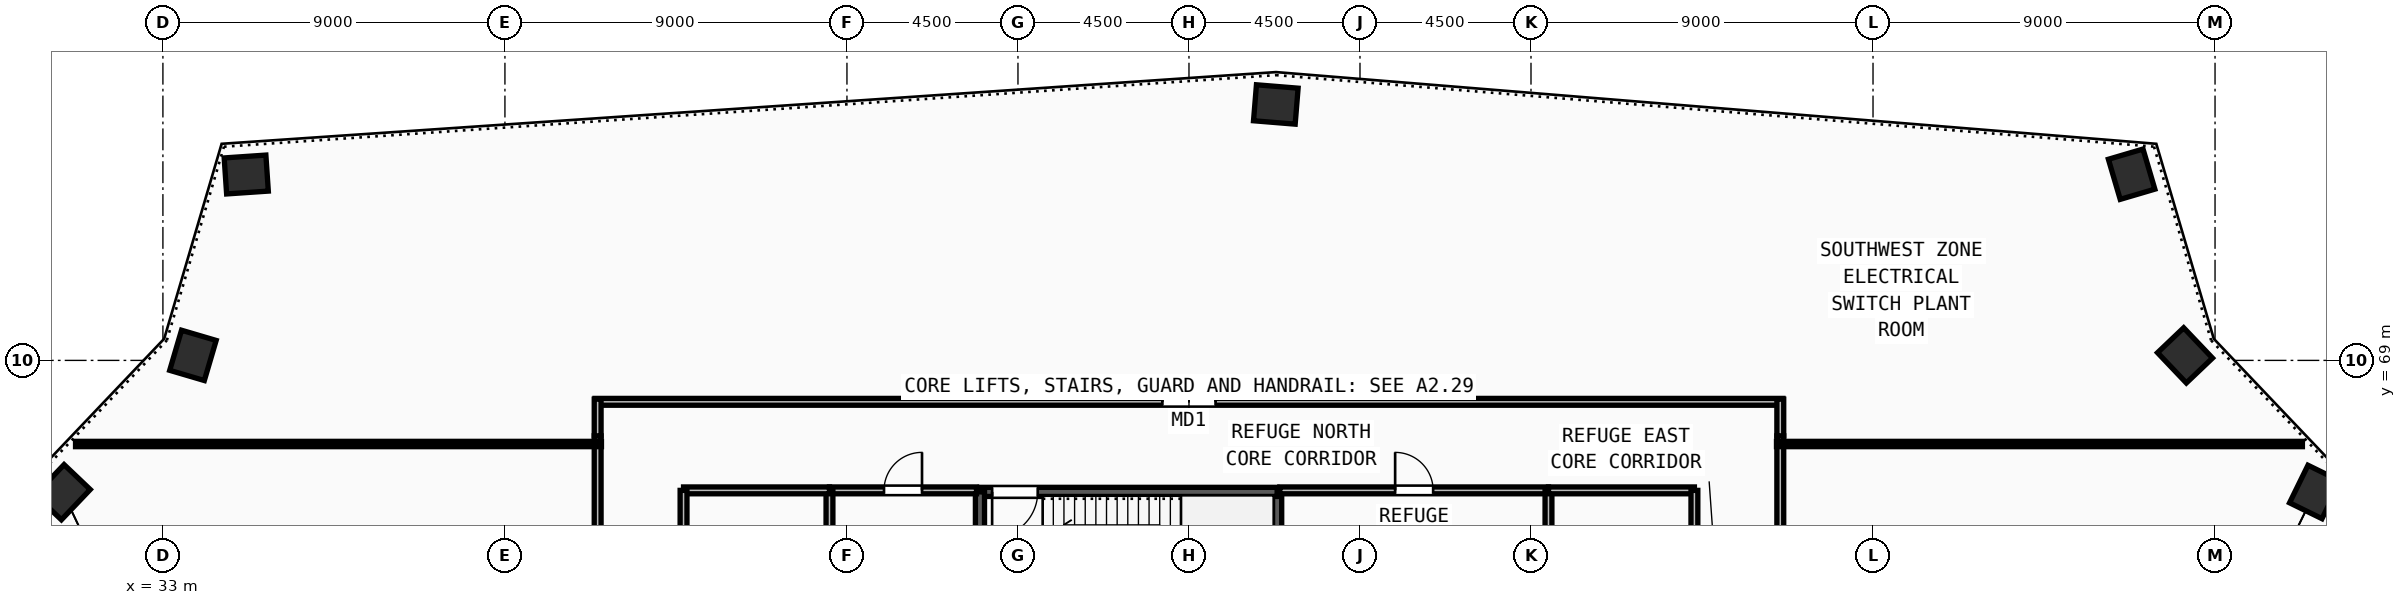
"""IFC4 building model, lengths in metres.
Left out: names, types, materials, properties, quantities, classifications, styles, units other than length and angle.
Written with IfcOpenShell. Run it as: python <this file> out.ifc"""

import sys

from ifc_helpers import new_model, si_unit, direction, frame, frame_2d, origin, origin_2d, place, context, subcontext, project, spatial, rectangle, extrude, source, transform, mapped, element, fill, save


model = new_model("IFC4")
c1 = context("Model", 3, precision=1e-05, world=origin(), true_north=direction((0.0, 1.0)))
c2 = subcontext(c1, "Body", "Model", "MODEL_VIEW")
j1 = project(units=[si_unit("LENGTHUNIT", "METRE"), si_unit("PLANEANGLEUNIT", "RADIAN")], contexts=[c1])
p1 = place(None, origin())
s1 = spatial("IfcSite", under=j1, at=p1, CompositionType="ELEMENT")
p2 = place(p1, origin())
s2 = spatial("IfcBuilding", under=s1, at=p2, CompositionType="ELEMENT")
p3 = place(p2, frame((0.0, 0.0, 324.0)))
s3 = spatial("IfcBuildingStorey", under=s2, at=p3, CompositionType="ELEMENT", Elevation=324.0)
m1 = source(origin(), c2, "Body", "SweptSolid", [
    extrude(rectangle(XDim=1.1, YDim=0.95, at=origin_2d()), origin(), (0.0, 0.0, 1.0), 4.5),
])
for number, where, z_axis, x_axis in (
    (1, (30.364, 65.532, 0.0), (0.0, 0.0, 1.0), (0.689, 0.724, 0.0)),
    (2, (33.79, 69.132, 0.0), (0.0, 0.0, 1.0), (0.283, 0.959, 0.0)),
    (3, (35.193, 73.891, 0.0), (0.0, 0.0, 1.0), (0.998, 0.068, 0.0)),
    (4, (62.285, 75.734, 0.0), (0.0, 0.0, 1.0), (-0.997, 0.081, 0.0)),
    (5, (84.805, 73.899, 0.0), (0.0, 0.0, 1.0), (-0.283, 0.959, 0.0)),
    (6, (86.21, 69.132, 0.0), (0.0, 0.0, 1.0), (-0.689, 0.724, 0.0)),
    (7, (89.63, 65.538, 0.0), (0.0, 0.0, 1.0), (0.44, 0.898, 0.0)),
):
    element("IfcColumn", number, at=place(p3, frame(where, z_axis=z_axis, x_axis=x_axis)), inside=s3, PredefinedType="COLUMN", context=c2, shape_type="MappedRepresentation", body=[
        mapped(m1, transform((0.0, 0.0, 0.0), x_axis=(1.0, 0.0, 0.0), y_axis=(0.0, 1.0, 0.0), z_axis=(0.0, 0.0, 1.0), scale=1.0)),
    ])
p4 = place(p3, frame((62.32, 62.1, 0.0), z_axis=(0.0, 0.0, 1.0), x_axis=(0.0, 1.0, 0.0)))
e8 = element("IfcWall", 8, at=p4, inside=s3, PredefinedType="SOLIDWALL", context=c2, shape_type="SweptSolid", body=[
    extrude(rectangle(XDim=3.44, YDim=0.24, at=frame_2d((1.72, 0.0))), origin(), (0.0, 0.0, 1.0), 4.32),
])
p5 = place(p3, frame((62.32, 65.54, 0.0), z_axis=(0.0, 0.0, 1.0), x_axis=(-1.0, 0.0, 0.0)))
e9 = element("IfcWall", 9, at=p5, inside=s3, PredefinedType="SOLIDWALL", context=c2, shape_type="SweptSolid", body=[
    extrude(rectangle(XDim=7.82, YDim=0.24, at=frame_2d((3.91, 0.0))), origin(), (0.0, 0.0, 1.0), 4.32),
])
m2 = source(origin(), c2, "Body", "SweptSolid", [
    extrude(rectangle(XDim=1.2, YDim=2.2, at=frame_2d((0.6, 1.1))), frame((0.0, 0.13, 0.0), z_axis=(0.0, -1.0, 0.0), x_axis=(1.0, 0.0, 0.0)), (0.0, 0.0, 1.0), 0.26),
])
p6 = place(p5, frame((6.3, 0.0, 0.0)))
e10 = element("IfcOpeningElement", 10, at=p6, cuts=e9, PredefinedType="OPENING", context=c2, shape_type="MappedRepresentation", body=[
    mapped(m2, transform((0.0, 0.0, 0.0), x_axis=(1.0, 0.0, 0.0), y_axis=(0.0, 1.0, 0.0), z_axis=(0.0, 0.0, 1.0), scale=1.0)),
])
p7 = place(p3, frame((54.5, 65.54, 0.0), z_axis=(0.0, 0.0, 1.0), x_axis=(0.0, -1.0, 0.0)))
e11 = element("IfcWall", 11, at=p7, inside=s3, PredefinedType="SOLIDWALL", context=c2, shape_type="SweptSolid", body=[
    extrude(rectangle(XDim=3.44, YDim=0.24, at=frame_2d((1.72, 0.0))), origin(), (0.0, 0.0, 1.0), 4.32),
])
p8 = place(p3, frame((50.54, 65.58, 0.0), z_axis=(0.0, 0.0, 1.0), x_axis=(1.0, 0.0, 0.0)))
e12 = element("IfcWall", 12, at=p8, inside=s3, PredefinedType="PARTITIONING", context=c2, shape_type="SweptSolid", body=[
    extrude(rectangle(XDim=3.87, YDim=0.18, at=frame_2d((1.935, 0.0))), origin(), (0.0, 0.0, 1.0), 4.32),
])
m3 = source(origin(), c2, "Body", "SweptSolid", [
    extrude(rectangle(XDim=1.0, YDim=2.2, at=frame_2d((0.5, 1.1))), frame((0.0, 0.1, 0.0), z_axis=(0.0, -1.0, 0.0), x_axis=(1.0, 0.0, 0.0)), (0.0, 0.0, 1.0), 0.2),
])
p9 = place(p8, frame((1.435, 0.0, 0.0)))
e13 = element("IfcOpeningElement", 13, at=p9, cuts=e12, PredefinedType="OPENING", context=c2, shape_type="MappedRepresentation", body=[
    mapped(m3, transform((0.0, 0.0, 0.0), x_axis=(1.0, 0.0, 0.0), y_axis=(0.0, 1.0, 0.0), z_axis=(0.0, 0.0, 1.0), scale=1.0)),
])
p10 = place(p3, frame((62.39, 65.58, 0.0), z_axis=(0.0, 0.0, 1.0), x_axis=(1.0, 0.0, 0.0)))
e14 = element("IfcWall", 14, at=p10, inside=s3, PredefinedType="PARTITIONING", context=c2, shape_type="SweptSolid", body=[
    extrude(rectangle(XDim=7.07, YDim=0.18, at=frame_2d((3.535, 0.0))), origin(), (0.0, 0.0, 1.0), 4.32),
])
p11 = place(p10, frame((3.035, 0.0, 0.0)))
e15 = element("IfcOpeningElement", 15, at=p11, cuts=e14, PredefinedType="OPENING", context=c2, shape_type="MappedRepresentation", body=[
    mapped(m3, transform((0.0, 0.0, 0.0), x_axis=(1.0, 0.0, 0.0), y_axis=(0.0, 1.0, 0.0), z_axis=(0.0, 0.0, 1.0), scale=1.0)),
])
p12 = place(p3, frame((75.56, 67.015, 0.0), z_axis=(0.0, 0.0, 1.0), x_axis=(0.0, -1.0, 0.0)))
e16 = element("IfcWall", 16, at=p12, inside=s3, PredefinedType="PARTITIONING", context=c2, shape_type="SweptSolid", body=[
    extrude(rectangle(XDim=22.43, YDim=0.18, at=frame_2d((11.215, 0.0))), origin(), (0.0, 0.0, 1.0), 4.32),
])
m4 = source(origin(), c2, "Body", "SweptSolid", [
    extrude(rectangle(XDim=1.3, YDim=2.2, at=frame_2d((0.65, 1.1))), frame((0.0, 0.1, 0.0), z_axis=(0.0, -1.0, 0.0), x_axis=(1.0, 0.0, 0.0)), (0.0, 0.0, 1.0), 0.2),
])
p13 = place(p12, frame((10.565, 0.0, 0.0)))
e17 = element("IfcOpeningElement", 17, at=p13, cuts=e16, PredefinedType="OPENING", context=c2, shape_type="MappedRepresentation", body=[
    mapped(m4, transform((0.0, 0.0, 0.0), x_axis=(1.0, 0.0, 0.0), y_axis=(0.0, 1.0, 0.0), z_axis=(0.0, 0.0, 1.0), scale=1.0)),
])
p14 = place(p3, frame((44.37, 67.91, 0.0), z_axis=(0.0, 0.0, 1.0), x_axis=(1.0, 0.0, 0.0)))
e18 = element("IfcWall", 18, at=p14, inside=s3, PredefinedType="PARTITIONING", context=c2, shape_type="SweptSolid", body=[
    extrude(rectangle(XDim=31.26, YDim=0.18, at=frame_2d((15.63, 0.0))), origin(), (0.0, 0.0, 1.0), 4.32),
])
m5 = source(origin(), c2, "Body", "SweptSolid", [
    extrude(rectangle(XDim=1.4, YDim=2.25, at=frame_2d((0.7, 1.125))), frame((0.0, 0.1, 0.0), z_axis=(0.0, -1.0, 0.0), x_axis=(1.0, 0.0, 0.0)), (0.0, 0.0, 1.0), 0.2),
])
p15 = place(p14, frame((14.93, 0.0, 0.0)))
e19 = element("IfcOpeningElement", 19, at=p15, cuts=e18, PredefinedType="OPENING", context=c2, shape_type="MappedRepresentation", body=[
    mapped(m5, transform((0.0, 0.0, 0.0), x_axis=(1.0, 0.0, 0.0), y_axis=(0.0, 1.0, 0.0), z_axis=(0.0, 0.0, 1.0), scale=1.0)),
])
p16 = place(p3, frame((44.44, 55.98, 0.0), z_axis=(0.0, 0.0, 1.0), x_axis=(0.0, 1.0, 0.0)))
e20 = element("IfcWall", 20, at=p16, inside=s3, PredefinedType="PARTITIONING", context=c2, shape_type="SweptSolid", body=[
    extrude(rectangle(XDim=11.035, YDim=0.18, at=frame_2d((5.518, 0.0))), origin(), (0.0, 0.0, 1.0), 4.32),
])
p17 = place(p16, frame((4.218, 0.0, 0.0)))
e21 = element("IfcOpeningElement", 21, at=p17, cuts=e20, PredefinedType="OPENING", context=c2, shape_type="MappedRepresentation", body=[
    mapped(m5, transform((0.0, 0.0, 0.0), x_axis=(1.0, 0.0, 0.0), y_axis=(0.0, 1.0, 0.0), z_axis=(0.0, 0.0, 1.0), scale=1.0)),
])
for number, where, z_axis, x_axis in (
    (22, (50.54, 61.95, 0.0), (0.0, 0.0, 1.0), (0.0, 1.0, 0.0)),
    (23, (69.46, 61.95, 0.0), (0.0, 0.0, 1.0), (0.0, 1.0, 0.0)),
):
    element("IfcWall", number, at=place(p3, frame(where, z_axis=z_axis, x_axis=x_axis)), inside=s3, PredefinedType="PARTITIONING", context=c2, shape_type="SweptSolid", body=[
        extrude(rectangle(XDim=3.63, YDim=0.18, at=frame_2d((1.815, 0.0))), origin(), (0.0, 0.0, 1.0), 4.32),
    ])
for number, where, z_axis, x_axis in (
    (24, (46.7, 65.58, 0.0), (0.0, 0.0, 1.0), (1.0, 0.0, 0.0)),
    (25, (69.46, 65.58, 0.0), (0.0, 0.0, 1.0), (1.0, 0.0, 0.0)),
):
    element("IfcWall", number, at=place(p3, frame(where, z_axis=z_axis, x_axis=x_axis)), inside=s3, PredefinedType="PARTITIONING", context=c2, shape_type="SweptSolid", body=[
        extrude(rectangle(XDim=3.84, YDim=0.18, at=frame_2d((1.92, 0.0))), origin(), (0.0, 0.0, 1.0), 4.32),
    ])
for number, where, z_axis, x_axis in (
    (26, (46.7, 60.06, 0.0), (0.0, 0.0, 1.0), (0.0, 1.0, 0.0)),
    (27, (73.3, 60.06, 0.0), (0.0, 0.0, 1.0), (0.0, 1.0, 0.0)),
):
    element("IfcWall", number, at=place(p3, frame(where, z_axis=z_axis, x_axis=x_axis)), inside=s3, PredefinedType="PARTITIONING", context=c2, shape_type="SweptSolid", body=[
        extrude(rectangle(XDim=5.52, YDim=0.18, at=frame_2d((2.76, 0.0))), origin(), (0.0, 0.0, 1.0), 4.32),
    ])
for number, where, z_axis, x_axis in (
    (28, (44.44, 67.015, 0.0), (0.0, 0.0, 1.0), (0.0, 1.0, 0.0)),
    (29, (75.56, 67.98, 0.0), (0.0, 0.0, 1.0), (0.0, -1.0, 0.0)),
):
    element("IfcWall", number, at=place(p3, frame(where, z_axis=z_axis, x_axis=x_axis)), inside=s3, PredefinedType="PARTITIONING", context=c2, shape_type="SweptSolid", body=[
        extrude(rectangle(XDim=0.965, YDim=0.18, at=frame_2d((0.482, 0.0))), origin(), (0.0, 0.0, 1.0), 4.32),
    ])
for number, where, z_axis, x_axis in (
    (30, (44.54, 66.8, 0.0), (0.0, 0.0, 1.0), (-1.0, 0.0, 0.0)),
    (31, (75.46, 66.8, 0.0), (0.0, 0.0, 1.0), (1.0, 0.0, 0.0)),
):
    element("IfcWall", number, at=place(p3, frame(where, z_axis=z_axis, x_axis=x_axis)), inside=s3, PredefinedType="PARTITIONING", context=c2, shape_type="SweptSolid", body=[
        extrude(rectangle(XDim=13.839, YDim=0.14, at=frame_2d((6.919, 0.0))), origin(), (0.0, 0.0, 1.0), 4.32),
    ])
m6 = source(origin(), c2, "Body", "SweptSolid", [
    extrude(rectangle(XDim=1.2, YDim=2.2, at=frame_2d((0.6, 1.1))), frame((0.0, 0.025, 0.0), z_axis=(0.0, -1.0, 0.0), x_axis=(1.0, 0.0, 0.0)), (0.0, 0.0, 1.0), 0.05),
])
p18 = place(p6, origin())
e32 = element("IfcDoor", 32, at=p18, inside=s3, OperationType="SINGLE_SWING_RIGHT", PredefinedType="DOOR", context=c2, shape_type="MappedRepresentation", body=[
    mapped(m6, transform((0.0, 0.0, 0.0), x_axis=(1.0, 0.0, 0.0), y_axis=(0.0, 1.0, 0.0), z_axis=(0.0, 0.0, 1.0), scale=1.0)),
])
fill(e10, e32)
m7 = source(origin(), c2, "Body", "SweptSolid", [
    extrude(rectangle(XDim=1.0, YDim=2.2, at=frame_2d((0.5, 1.1))), frame((0.0, 0.025, 0.0), z_axis=(0.0, -1.0, 0.0), x_axis=(1.0, 0.0, 0.0)), (0.0, 0.0, 1.0), 0.05),
])
p19 = place(p9, origin())
e33 = element("IfcDoor", 33, at=p19, inside=s3, OperationType="SINGLE_SWING_RIGHT", PredefinedType="DOOR", context=c2, shape_type="MappedRepresentation", body=[
    mapped(m7, transform((0.0, 0.0, 0.0), x_axis=(1.0, 0.0, 0.0), y_axis=(0.0, 1.0, 0.0), z_axis=(0.0, 0.0, 1.0), scale=1.0)),
])
fill(e13, e33)
p20 = place(p11, origin())
e34 = element("IfcDoor", 34, at=p20, inside=s3, OperationType="SINGLE_SWING_LEFT", PredefinedType="DOOR", context=c2, shape_type="MappedRepresentation", body=[
    mapped(m7, transform((0.0, 0.0, 0.0), x_axis=(1.0, 0.0, 0.0), y_axis=(0.0, 1.0, 0.0), z_axis=(0.0, 0.0, 1.0), scale=1.0)),
])
fill(e15, e34)
m8 = source(origin(), c2, "Body", "SweptSolid", [
    extrude(rectangle(XDim=1.4, YDim=2.25, at=frame_2d((0.7, 1.125))), frame((0.0, 0.025, 0.0), z_axis=(0.0, -1.0, 0.0), x_axis=(1.0, 0.0, 0.0)), (0.0, 0.0, 1.0), 0.05),
])
p21 = place(p15, origin())
e35 = element("IfcDoor", 35, at=p21, inside=s3, OperationType="DOUBLE_DOOR_SINGLE_SWING", PredefinedType="DOOR", context=c2, shape_type="MappedRepresentation", body=[
    mapped(m8, transform((0.0, 0.0, 0.0), x_axis=(1.0, 0.0, 0.0), y_axis=(0.0, 1.0, 0.0), z_axis=(0.0, 0.0, 1.0), scale=1.0)),
])
fill(e19, e35)
save(model, sys.argv[1])
